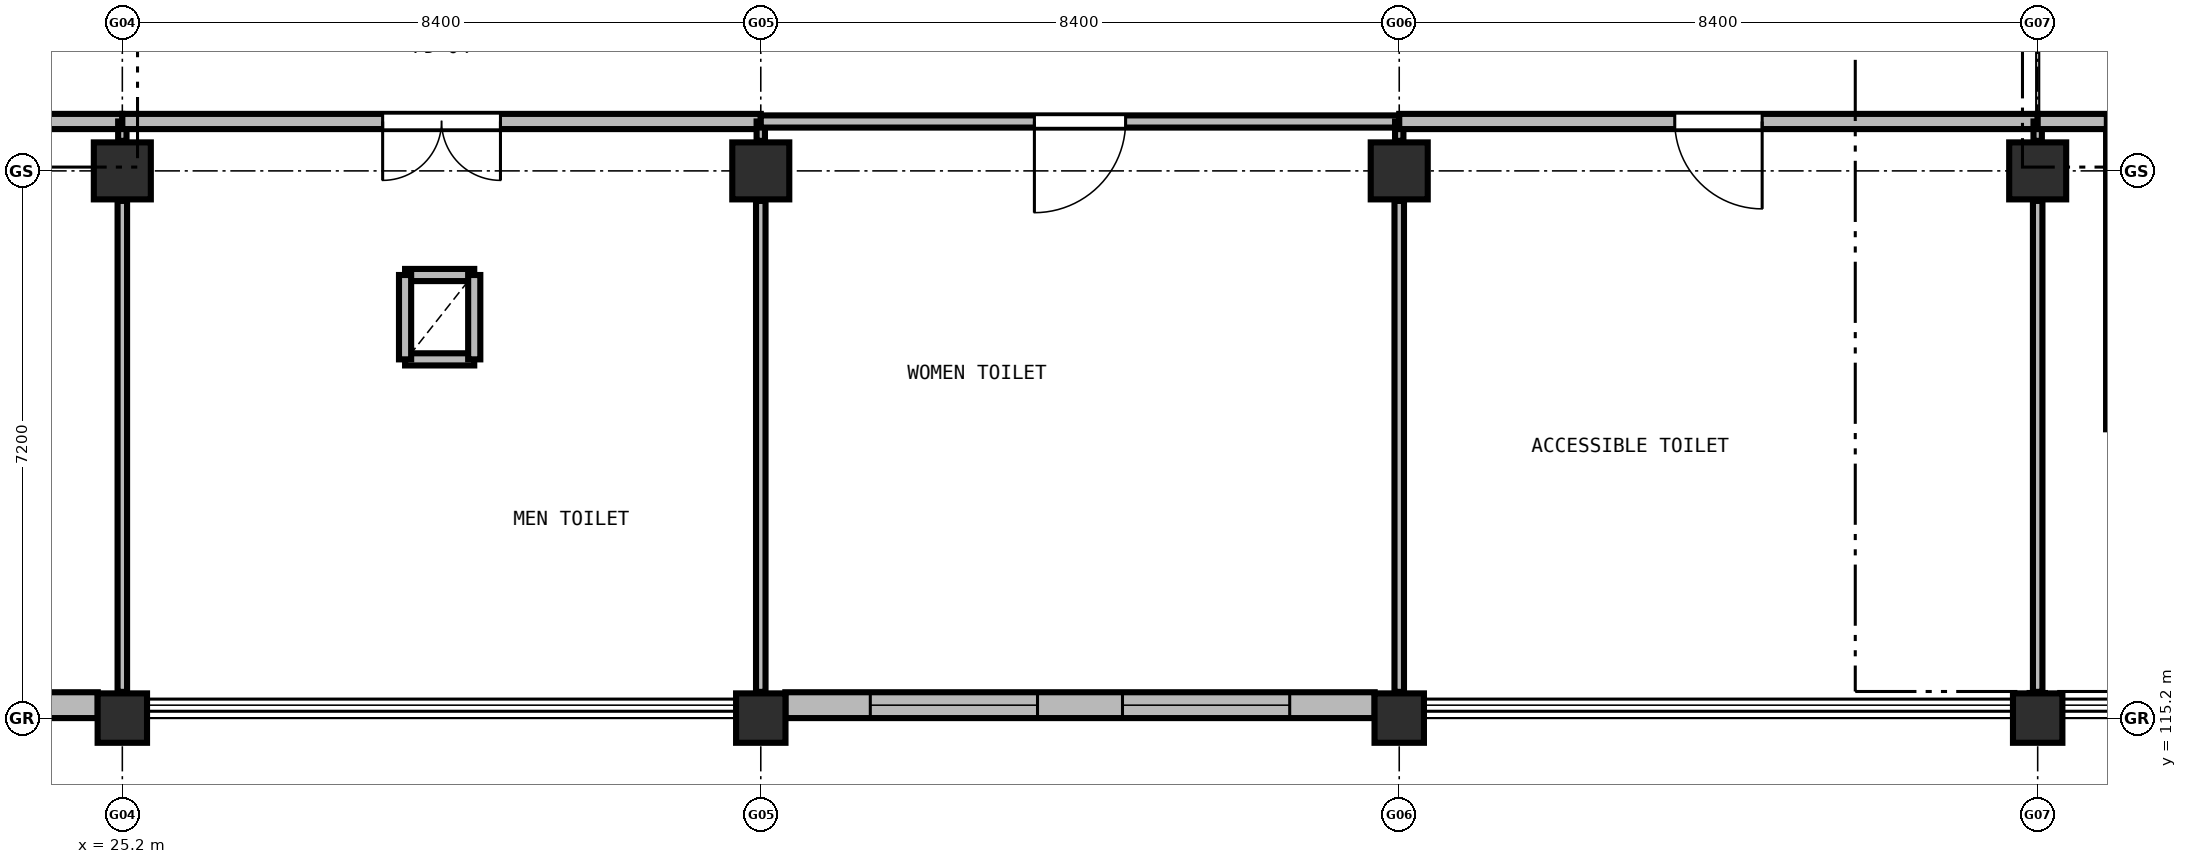
"""IFC4 building model, lengths in metres.
Left out: names, types, materials, properties, quantities, classifications, styles, units other than length and angle.
Written with IfcOpenShell. Run it as: python <this file> out.ifc"""

import sys

from ifc_helpers import new_model, si_unit, direction, frame, frame_2d, origin, origin_2d, place, context, subcontext, project, spatial, rectangle, extrude, element, fill, save


model = new_model("IFC4")
c1 = context("Model", 3, precision=1e-05, world=origin(), true_north=direction((0.0, 1.0)))
c2 = subcontext(c1, "Body", "Model", "MODEL_VIEW")
j1 = project(units=[si_unit("LENGTHUNIT", "METRE"), si_unit("PLANEANGLEUNIT", "RADIAN")], contexts=[c1])
p1 = place(None, origin())
s1 = spatial("IfcSite", under=j1, at=p1, CompositionType="ELEMENT")
p2 = place(p1, origin())
s2 = spatial("IfcBuilding", under=s1, at=p2, CompositionType="ELEMENT")
p3 = place(p2, frame((0.0, 0.0, 5.1)))
s3 = spatial("IfcBuildingStorey", under=s2, at=p3, CompositionType="ELEMENT", Elevation=5.1)
p4 = place(p3, frame((25.2, 115.2, 0.0), z_axis=(0.0, 0.0, 1.0), x_axis=(1.0, 0.0, 0.0)))
e1 = element("IfcColumn", 1, at=p4, inside=s3, PredefinedType="COLUMN", context=c2, shape_type="SweptSolid", body=[
    extrude(rectangle(XDim=0.65, YDim=0.65, at=origin_2d()), origin(), (0.0, 0.0, 1.0), 4.2),
])
p5 = place(p3, frame((25.2, 122.4, 0.0), z_axis=(0.0, 0.0, 1.0), x_axis=(1.0, 0.0, 0.0)))
e2 = element("IfcColumn", 2, at=p5, inside=s3, PredefinedType="COLUMN", context=c2, shape_type="SweptSolid", body=[
    extrude(rectangle(XDim=0.75, YDim=0.75, at=origin_2d()), origin(), (0.0, 0.0, 1.0), 4.2),
])
p6 = place(p3, frame((33.6, 115.2, 0.0), z_axis=(0.0, 0.0, 1.0), x_axis=(1.0, 0.0, 0.0)))
e3 = element("IfcColumn", 3, at=p6, inside=s3, PredefinedType="COLUMN", context=c2, shape_type="SweptSolid", body=[
    extrude(rectangle(XDim=0.65, YDim=0.65, at=origin_2d()), origin(), (0.0, 0.0, 1.0), 4.2),
])
p7 = place(p3, frame((33.6, 122.4, 0.0), z_axis=(0.0, 0.0, 1.0), x_axis=(1.0, 0.0, 0.0)))
e4 = element("IfcColumn", 4, at=p7, inside=s3, PredefinedType="COLUMN", context=c2, shape_type="SweptSolid", body=[
    extrude(rectangle(XDim=0.75, YDim=0.75, at=origin_2d()), origin(), (0.0, 0.0, 1.0), 4.2),
])
p8 = place(p3, frame((42.0, 115.2, 0.0), z_axis=(0.0, 0.0, 1.0), x_axis=(1.0, 0.0, 0.0)))
e5 = element("IfcColumn", 5, at=p8, inside=s3, PredefinedType="COLUMN", context=c2, shape_type="SweptSolid", body=[
    extrude(rectangle(XDim=0.65, YDim=0.65, at=origin_2d()), origin(), (0.0, 0.0, 1.0), 4.2),
])
p9 = place(p3, frame((42.0, 122.4, 0.0), z_axis=(0.0, 0.0, 1.0), x_axis=(1.0, 0.0, 0.0)))
e6 = element("IfcColumn", 6, at=p9, inside=s3, PredefinedType="COLUMN", context=c2, shape_type="SweptSolid", body=[
    extrude(rectangle(XDim=0.75, YDim=0.75, at=origin_2d()), origin(), (0.0, 0.0, 1.0), 4.2),
])
p10 = place(p3, frame((50.4, 115.2, 0.0), z_axis=(0.0, 0.0, 1.0), x_axis=(1.0, 0.0, 0.0)))
e7 = element("IfcColumn", 7, at=p10, inside=s3, PredefinedType="COLUMN", context=c2, shape_type="SweptSolid", body=[
    extrude(rectangle(XDim=0.65, YDim=0.65, at=origin_2d()), origin(), (0.0, 0.0, 1.0), 4.2),
])
p11 = place(p3, frame((50.4, 122.4, 0.0), z_axis=(0.0, 0.0, 1.0), x_axis=(1.0, 0.0, 0.0)))
e8 = element("IfcColumn", 8, at=p11, inside=s3, PredefinedType="COLUMN", context=c2, shape_type="SweptSolid", body=[
    extrude(rectangle(XDim=0.75, YDim=0.75, at=origin_2d()), origin(), (0.0, 0.0, 1.0), 4.2),
])
p12 = place(p3, frame((41.677, 115.37, 0.0), z_axis=(0.0, 0.0, 1.0), x_axis=(-1.0, 0.0, 0.0)))
e9 = element("IfcWall", 9, at=p12, inside=s3, PredefinedType="SOLIDWALL", context=c2, shape_type="SweptSolid", body=[
    extrude(rectangle(XDim=7.754, YDim=0.34, at=frame_2d((3.877, 0.0))), origin(), (0.0, 0.0, 1.0), 3.11),
])
p13 = place(p12, frame((1.118, 0.0, 0.95)))
e10 = element("IfcOpeningElement", 10, at=p13, cuts=e9, PredefinedType="OPENING", context=c2, shape_type="SweptSolid", body=[
    extrude(rectangle(XDim=2.2, YDim=1.91, at=frame_2d((1.1, 0.955))), frame((0.0, 0.18, 0.0), z_axis=(0.0, -1.0, 0.0), x_axis=(1.0, 0.0, 0.0)), (0.0, 0.0, 1.0), 0.36),
])
p14 = place(p12, frame((4.436, 0.0, 0.95)))
e11 = element("IfcOpeningElement", 11, at=p14, cuts=e9, PredefinedType="OPENING", context=c2, shape_type="SweptSolid", body=[
    extrude(rectangle(XDim=2.2, YDim=1.91, at=frame_2d((1.1, 0.955))), frame((0.0, 0.18, 0.0), z_axis=(0.0, -1.0, 0.0), x_axis=(1.0, 0.0, 0.0)), (0.0, 0.0, 1.0), 0.36),
])
p15 = place(p3, frame((24.877, 115.37, 0.0), z_axis=(0.0, 0.0, 1.0), x_axis=(-1.0, 0.0, 0.0)))
e12 = element("IfcWall", 12, at=p15, inside=s3, PredefinedType="SOLIDWALL", context=c2, shape_type="SweptSolid", body=[
    extrude(rectangle(XDim=7.754, YDim=0.34, at=frame_2d((3.877, 0.0))), origin(), (0.0, 0.0, 1.0), 3.11),
])
p16 = place(p15, frame((1.385, 0.0, 0.95)))
e13 = element("IfcOpeningElement", 13, at=p16, cuts=e12, PredefinedType="OPENING", context=c2, shape_type="SweptSolid", body=[
    extrude(rectangle(XDim=1.8, YDim=1.91, at=frame_2d((0.9, 0.955))), frame((0.0, 0.18, 0.0), z_axis=(0.0, -1.0, 0.0), x_axis=(1.0, 0.0, 0.0)), (0.0, 0.0, 1.0), 0.36),
])
p17 = place(p15, frame((4.569, 0.0, 0.95)))
e14 = element("IfcOpeningElement", 14, at=p17, cuts=e12, PredefinedType="OPENING", context=c2, shape_type="SweptSolid", body=[
    extrude(rectangle(XDim=1.8, YDim=1.91, at=frame_2d((0.9, 0.955))), frame((0.0, 0.18, 0.0), z_axis=(0.0, -1.0, 0.0), x_axis=(1.0, 0.0, 0.0)), (0.0, 0.0, 1.0), 0.36),
])
p18 = place(p3, frame((51.45, 119.0, 0.0), z_axis=(0.0, 0.0, 1.0), x_axis=(0.0, 1.0, 0.0)))
e15 = element("IfcWall", 15, at=p18, inside=s3, PredefinedType="SHEAR", context=c2, shape_type="SweptSolid", body=[
    extrude(rectangle(XDim=4.1, YDim=0.3, at=frame_2d((2.05, 0.0))), origin(), (0.0, 0.0, 1.0), 3.92),
])
for number, where, z_axis, x_axis in (
    (16, (28.92, 119.92, 0.0), (0.0, 0.0, 1.0), (1.0, 0.0, 0.0)),
    (17, (29.83, 121.03, 0.0), (0.0, 0.0, 1.0), (-1.0, 0.0, 0.0)),
):
    element("IfcWall", number, at=place(p3, frame(where, z_axis=z_axis, x_axis=x_axis)), inside=s3, PredefinedType="PARTITIONING", context=c2, shape_type="SweptSolid", body=[
        extrude(rectangle(XDim=0.91, YDim=0.16, at=frame_2d((0.455, 0.0))), origin(), (0.0, 0.0, 1.0), 3.65),
    ])
for number, where, z_axis, x_axis in (
    (18, (28.92, 121.03, 0.0), (0.0, 0.0, 1.0), (0.0, -1.0, 0.0)),
    (19, (29.83, 119.92, 0.0), (0.0, 0.0, 1.0), (0.0, 1.0, 0.0)),
):
    element("IfcWall", number, at=place(p3, frame(where, z_axis=z_axis, x_axis=x_axis)), inside=s3, PredefinedType="PARTITIONING", context=c2, shape_type="SweptSolid", body=[
        extrude(rectangle(XDim=1.11, YDim=0.16, at=frame_2d((0.555, 0.0))), origin(), (0.0, 0.0, 1.0), 3.65),
    ])
p19 = place(p3, frame((25.2, 123.05, 0.0), z_axis=(0.0, 0.0, 1.0), x_axis=(-1.0, 0.0, 0.0)))
e20 = element("IfcWall", 20, at=p19, inside=s3, PredefinedType="SOLIDWALL", context=c2, shape_type="SweptSolid", body=[
    extrude(rectangle(XDim=6.11, YDim=0.2, at=frame_2d((3.055, 0.0))), origin(), (0.0, 0.0, 1.0), 3.305),
])
p20 = place(p3, frame((25.2, 115.545, 0.0), z_axis=(0.0, 0.0, 1.0), x_axis=(0.0, 1.0, 0.0)))
e21 = element("IfcWall", 21, at=p20, inside=s3, PredefinedType="PARTITIONING", context=c2, shape_type="SweptSolid", body=[
    extrude(rectangle(XDim=6.46, YDim=0.125, at=frame_2d((3.23, 0.0))), origin(), (0.0, 0.0, 1.0), 3.105),
])
p21 = place(p3, frame((25.2, 122.795, 0.0), z_axis=(0.0, 0.0, 1.0), x_axis=(0.0, 1.0, 0.0)))
e22 = element("IfcWall", 22, at=p21, inside=s3, PredefinedType="PARTITIONING", context=c2, shape_type="SweptSolid", body=[
    extrude(rectangle(XDim=0.255, YDim=0.11, at=frame_2d((0.127, 0.0))), origin(), (0.0, 0.0, 1.0), 3.155),
])
p22 = place(p3, frame((33.6, 123.05, 0.0), z_axis=(0.0, 0.0, 1.0), x_axis=(-1.0, 0.0, 0.0)))
e23 = element("IfcWall", 23, at=p22, inside=s3, PredefinedType="SOLIDWALL", context=c2, shape_type="SweptSolid", body=[
    extrude(rectangle(XDim=8.4, YDim=0.2, at=frame_2d((4.2, 0.0))), origin(), (0.0, 0.0, 1.0), 3.305),
])
p23 = place(p22, frame((3.425, 0.0, 0.0)))
e24 = element("IfcOpeningElement", 24, at=p23, cuts=e23, PredefinedType="OPENING", context=c2, shape_type="SweptSolid", body=[
    extrude(rectangle(XDim=1.55, YDim=2.2, at=frame_2d((0.775, 1.1))), frame((0.0, 0.11, 0.0), z_axis=(0.0, -1.0, 0.0), x_axis=(1.0, 0.0, 0.0)), (0.0, 0.0, 1.0), 0.22),
])
p24 = place(p3, frame((33.6, 115.545, 0.0), z_axis=(0.0, 0.0, 1.0), x_axis=(0.0, 1.0, 0.0)))
e25 = element("IfcWall", 25, at=p24, inside=s3, PredefinedType="PARTITIONING", context=c2, shape_type="SweptSolid", body=[
    extrude(rectangle(XDim=6.46, YDim=0.125, at=frame_2d((3.23, 0.0))), origin(), (0.0, 0.0, 1.0), 3.105),
])
p25 = place(p3, frame((33.6, 122.795, 0.0), z_axis=(0.0, 0.0, 1.0), x_axis=(0.0, 1.0, 0.0)))
e26 = element("IfcWall", 26, at=p25, inside=s3, PredefinedType="PARTITIONING", context=c2, shape_type="SweptSolid", body=[
    extrude(rectangle(XDim=0.255, YDim=0.11, at=frame_2d((0.127, 0.0))), origin(), (0.0, 0.0, 1.0), 3.155),
])
p26 = place(p3, frame((42.0, 123.05, 0.0), z_axis=(0.0, 0.0, 1.0), x_axis=(-1.0, 0.0, 0.0)))
e27 = element("IfcWall", 27, at=p26, inside=s3, PredefinedType="PARTITIONING", context=c2, shape_type="SweptSolid", body=[
    extrude(rectangle(XDim=8.4, YDim=0.16, at=frame_2d((4.2, 0.0))), origin(), (0.0, 0.0, 1.0), 3.305),
])
p27 = place(p26, frame((3.6, 0.0, 0.0)))
e28 = element("IfcOpeningElement", 28, at=p27, cuts=e27, PredefinedType="OPENING", context=c2, shape_type="SweptSolid", body=[
    extrude(rectangle(XDim=1.2, YDim=2.15, at=frame_2d((0.6, 1.075))), frame((0.0, 0.09, 0.0), z_axis=(0.0, -1.0, 0.0), x_axis=(1.0, 0.0, 0.0)), (0.0, 0.0, 1.0), 0.18),
])
p28 = place(p3, frame((42.0, 115.545, 0.0), z_axis=(0.0, 0.0, 1.0), x_axis=(0.0, 1.0, 0.0)))
e29 = element("IfcWall", 29, at=p28, inside=s3, PredefinedType="PARTITIONING", context=c2, shape_type="SweptSolid", body=[
    extrude(rectangle(XDim=6.46, YDim=0.125, at=frame_2d((3.23, 0.0))), origin(), (0.0, 0.0, 1.0), 3.105),
])
p29 = place(p3, frame((42.0, 122.795, 0.0), z_axis=(0.0, 0.0, 1.0), x_axis=(0.0, 1.0, 0.0)))
e30 = element("IfcWall", 30, at=p29, inside=s3, PredefinedType="PARTITIONING", context=c2, shape_type="SweptSolid", body=[
    extrude(rectangle(XDim=0.255, YDim=0.11, at=frame_2d((0.127, 0.0))), origin(), (0.0, 0.0, 1.0), 3.155),
])
p30 = place(p3, frame((50.4, 123.05, 0.0), z_axis=(0.0, 0.0, 1.0), x_axis=(-1.0, 0.0, 0.0)))
e31 = element("IfcWall", 31, at=p30, inside=s3, PredefinedType="SOLIDWALL", context=c2, shape_type="SweptSolid", body=[
    extrude(rectangle(XDim=8.4, YDim=0.2, at=frame_2d((4.2, 0.0))), origin(), (0.0, 0.0, 1.0), 3.305),
])
p31 = place(p30, frame((3.625, 0.0, 0.0)))
e32 = element("IfcOpeningElement", 32, at=p31, cuts=e31, PredefinedType="OPENING", context=c2, shape_type="SweptSolid", body=[
    extrude(rectangle(XDim=1.15, YDim=2.15, at=frame_2d((0.575, 1.075))), frame((0.0, 0.11, 0.0), z_axis=(0.0, -1.0, 0.0), x_axis=(1.0, 0.0, 0.0)), (0.0, 0.0, 1.0), 0.22),
])
p32 = place(p3, frame((50.4, 115.545, 0.0), z_axis=(0.0, 0.0, 1.0), x_axis=(0.0, 1.0, 0.0)))
e33 = element("IfcWall", 33, at=p32, inside=s3, PredefinedType="PARTITIONING", context=c2, shape_type="SweptSolid", body=[
    extrude(rectangle(XDim=6.46, YDim=0.125, at=frame_2d((3.23, 0.0))), origin(), (0.0, 0.0, 1.0), 3.105),
])
p33 = place(p3, frame((50.4, 122.795, 0.0), z_axis=(0.0, 0.0, 1.0), x_axis=(0.0, 1.0, 0.0)))
e34 = element("IfcWall", 34, at=p33, inside=s3, PredefinedType="PARTITIONING", context=c2, shape_type="SweptSolid", body=[
    extrude(rectangle(XDim=0.255, YDim=0.11, at=frame_2d((0.127, 0.0))), origin(), (0.0, 0.0, 1.0), 3.155),
])
p34 = place(p3, frame((51.31, 123.05, 0.0), z_axis=(0.0, 0.0, 1.0), x_axis=(-1.0, 0.0, 0.0)))
e35 = element("IfcWall", 35, at=p34, inside=s3, PredefinedType="SOLIDWALL", context=c2, shape_type="SweptSolid", body=[
    extrude(rectangle(XDim=0.91, YDim=0.2, at=frame_2d((0.455, 0.0))), origin(), (0.0, 0.0, 1.0), 3.305),
])
p35 = place(p13, origin())
e36 = element("IfcWindow", 36, at=p35, inside=s3, PartitioningType="SINGLE_PANEL", PredefinedType="WINDOW", context=c2, shape_type="SweptSolid", body=[
    extrude(rectangle(XDim=2.2, YDim=1.91, at=frame_2d((1.1, 0.955))), frame((0.0, 0.03, 0.0), z_axis=(0.0, -1.0, 0.0), x_axis=(1.0, 0.0, 0.0)), (0.0, 0.0, 1.0), 0.06),
])
fill(e10, e36)
p36 = place(p14, origin())
e37 = element("IfcWindow", 37, at=p36, inside=s3, PartitioningType="SINGLE_PANEL", PredefinedType="WINDOW", context=c2, shape_type="SweptSolid", body=[
    extrude(rectangle(XDim=2.2, YDim=1.91, at=frame_2d((1.1, 0.955))), frame((0.0, 0.03, 0.0), z_axis=(0.0, -1.0, 0.0), x_axis=(1.0, 0.0, 0.0)), (0.0, 0.0, 1.0), 0.06),
])
fill(e11, e37)
p37 = place(p23, origin())
e38 = element("IfcDoor", 38, at=p37, inside=s3, OperationType="DOUBLE_DOOR_SINGLE_SWING", PredefinedType="DOOR", context=c2, shape_type="SweptSolid", body=[
    extrude(rectangle(XDim=1.55, YDim=2.2, at=frame_2d((0.775, 1.1))), frame((0.0, 0.025, 0.0), z_axis=(0.0, -1.0, 0.0), x_axis=(1.0, 0.0, 0.0)), (0.0, 0.0, 1.0), 0.05),
])
fill(e24, e38)
p38 = place(p27, origin())
e39 = element("IfcDoor", 39, at=p38, inside=s3, OperationType="SINGLE_SWING_RIGHT", PredefinedType="DOOR", context=c2, shape_type="SweptSolid", body=[
    extrude(rectangle(XDim=1.2, YDim=2.15, at=frame_2d((0.6, 1.075))), frame((0.0, 0.025, 0.0), z_axis=(0.0, -1.0, 0.0), x_axis=(1.0, 0.0, 0.0)), (0.0, 0.0, 1.0), 0.05),
])
fill(e28, e39)
p39 = place(p31, origin())
e40 = element("IfcDoor", 40, at=p39, inside=s3, OperationType="SINGLE_SWING_LEFT", PredefinedType="DOOR", context=c2, shape_type="SweptSolid", body=[
    extrude(rectangle(XDim=1.15, YDim=2.15, at=frame_2d((0.575, 1.075))), frame((0.0, 0.025, 0.0), z_axis=(0.0, -1.0, 0.0), x_axis=(1.0, 0.0, 0.0)), (0.0, 0.0, 1.0), 0.05),
])
fill(e32, e40)
save(model, sys.argv[1])
